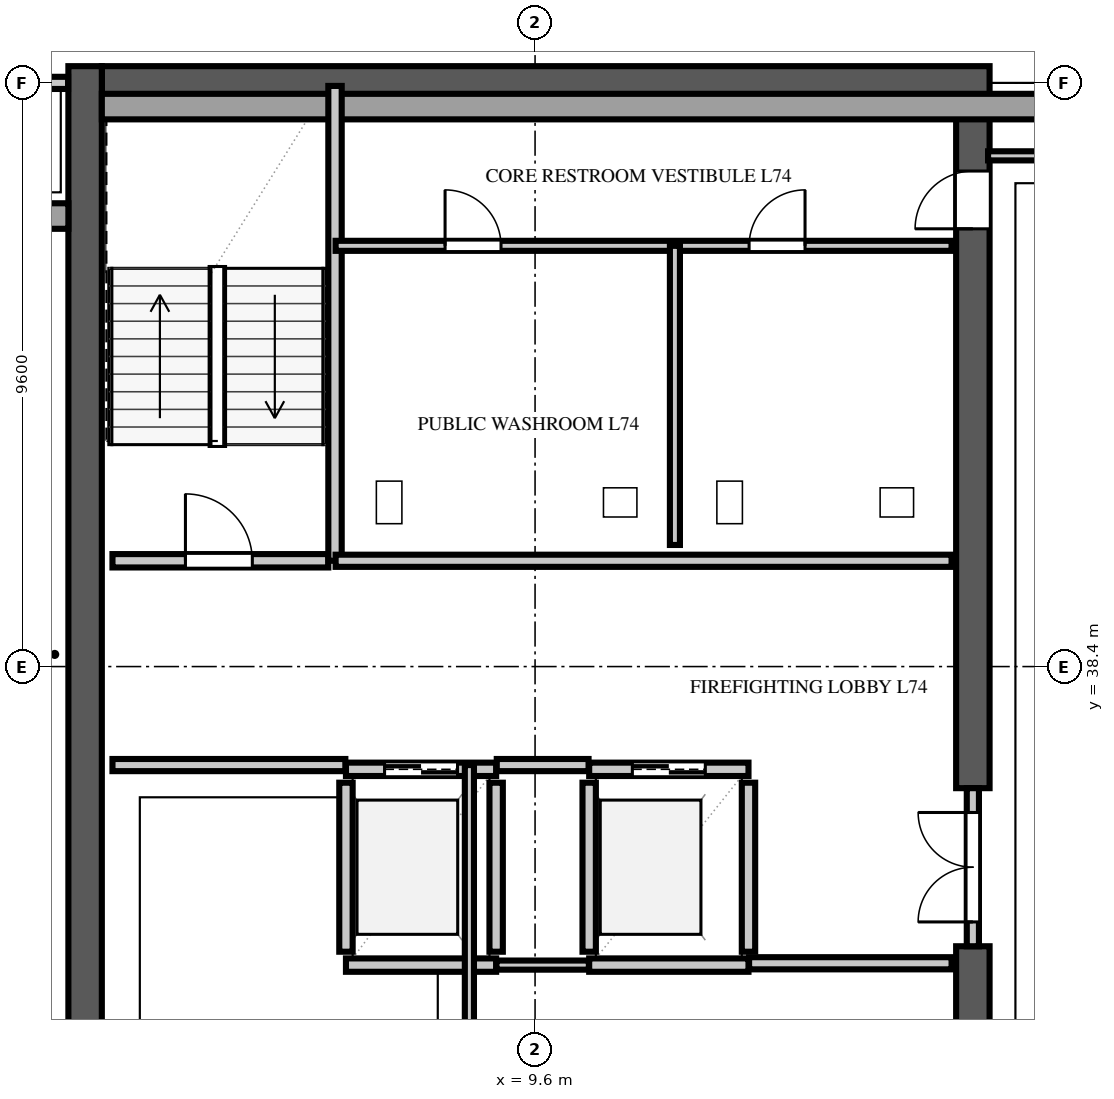
"""IFC4 building model, lengths in metres.
Left out: names, types, materials, properties, quantities, classifications, styles, units other than length and angle.
Written with IfcOpenShell. Run it as: python <this file> out.ifc"""

import sys

from ifc_helpers import new_model, si_unit, direction, frame, frame_2d, origin, place, context, subcontext, project, spatial, rectangle, extrude, element, fill, save


model = new_model("IFC4")
c1 = context("Model", 3, precision=1e-05, world=origin(), true_north=direction((0.0, 1.0)))
c2 = subcontext(c1, "Body", "Model", "MODEL_VIEW")
j1 = project(units=[si_unit("LENGTHUNIT", "METRE"), si_unit("PLANEANGLEUNIT", "RADIAN")], contexts=[c1])
p1 = place(None, origin())
s1 = spatial("IfcSite", under=j1, at=p1, CompositionType="ELEMENT")
p2 = place(p1, origin())
s2 = spatial("IfcBuilding", under=s1, at=p2, CompositionType="ELEMENT")
p3 = place(p2, frame((0.0, 0.0, 292.4)))
s3 = spatial("IfcBuildingStorey", under=s2, at=p3, CompositionType="ELEMENT", Elevation=292.4)
p4 = place(p3, frame((2.475, 48.0, 0.0), z_axis=(0.0, 0.0, 1.0), x_axis=(1.0, 0.0, 0.0)))
e1 = element("IfcWall", 1, at=p4, inside=s3, PredefinedType="SHEAR", context=c2, shape_type="SweptSolid", body=[
    extrude(rectangle(XDim=14.6, YDim=0.55, at=frame_2d((7.3, 0.0))), origin(), (0.0, 0.0, 1.0), 3.54),
])
p5 = place(p3, frame((2.2, 9.325, 0.0), z_axis=(0.0, 0.0, 1.0), x_axis=(0.0, 1.0, 0.0)))
e2 = element("IfcWall", 2, at=p5, inside=s3, PredefinedType="SHEAR", context=c2, shape_type="SweptSolid", body=[
    extrude(rectangle(XDim=38.95, YDim=0.55, at=frame_2d((19.475, 0.0))), origin(), (0.0, 0.0, 1.0), 3.54),
])
p6 = place(p3, frame((16.8, 26.0, 0.0), z_axis=(0.0, 0.0, 1.0), x_axis=(0.0, 1.0, 0.0)))
e3 = element("IfcWall", 3, at=p6, inside=s3, PredefinedType="SHEAR", context=c2, shape_type="SweptSolid", body=[
    extrude(rectangle(XDim=7.8, YDim=0.55, at=frame_2d((3.9, 0.0))), origin(), (0.0, 0.0, 1.0), 3.54),
])
p7 = place(p3, frame((16.8, 36.4, 0.0), z_axis=(0.0, 0.0, 1.0), x_axis=(0.0, 1.0, 0.0)))
e4 = element("IfcWall", 4, at=p7, inside=s3, PredefinedType="SHEAR", context=c2, shape_type="SweptSolid", body=[
    extrude(rectangle(XDim=11.325, YDim=0.55, at=frame_2d((5.663, 0.0))), origin(), (0.0, 0.0, 1.0), 3.54),
])
p8 = place(p7, frame((9.2, 0.0, 0.0)))
e5 = element("IfcOpeningElement", 5, at=p8, cuts=e4, PredefinedType="OPENING", context=c2, shape_type="SweptSolid", body=[
    extrude(rectangle(XDim=0.95, YDim=2.15, at=frame_2d((0.475, 1.075))), frame((0.0, 0.287, 0.0), z_axis=(0.0, -1.0, 0.0), x_axis=(1.0, 0.0, 0.0)), (0.0, 0.0, 1.0), 0.574),
])
p9 = place(p3, frame((36.56, 47.61, 0.0), z_axis=(0.0, 0.0, 1.0), x_axis=(-1.0, 0.0, 0.0)))
e6 = element("IfcWall", 6, at=p9, inside=s3, PredefinedType="SOLIDWALL", context=c2, shape_type="SweptSolid", body=[
    extrude(rectangle(XDim=34.085, YDim=0.42, at=frame_2d((17.042, 0.0))), origin(), (0.0, 0.0, 1.0), 3.54),
])
p10 = place(p9, frame((4.885, 0.0, 0.9)))
e7 = element("IfcOpeningElement", 7, at=p10, cuts=e6, PredefinedType="OPENING", context=c2, shape_type="SweptSolid", body=[
    extrude(rectangle(XDim=0.95, YDim=1.85, at=frame_2d((0.475, 0.925))), frame((0.0, 0.222, 0.0), z_axis=(0.0, -1.0, 0.0), x_axis=(1.0, 0.0, 0.0)), (0.0, 0.0, 1.0), 0.444),
])
p11 = place(p9, frame((9.41, 0.0, 0.9)))
e8 = element("IfcOpeningElement", 8, at=p11, cuts=e6, PredefinedType="OPENING", context=c2, shape_type="SweptSolid", body=[
    extrude(rectangle(XDim=1.5, YDim=1.85, at=frame_2d((0.75, 0.925))), frame((0.0, 0.222, 0.0), z_axis=(0.0, -1.0, 0.0), x_axis=(1.0, 0.0, 0.0)), (0.0, 0.0, 1.0), 0.444),
])
p12 = place(p9, frame((14.485, 0.0, 0.9)))
e9 = element("IfcOpeningElement", 9, at=p12, cuts=e6, PredefinedType="OPENING", context=c2, shape_type="SweptSolid", body=[
    extrude(rectangle(XDim=0.95, YDim=1.85, at=frame_2d((0.475, 0.925))), frame((0.0, 0.222, 0.0), z_axis=(0.0, -1.0, 0.0), x_axis=(1.0, 0.0, 0.0)), (0.0, 0.0, 1.0), 0.444),
])
p13 = place(p3, frame((1.925, 45.81, 0.0), z_axis=(0.0, 0.0, 1.0), x_axis=(-1.0, 0.0, 0.0)))
e10 = element("IfcWall", 10, at=p13, inside=s3, PredefinedType="SOLIDWALL", context=c2, shape_type="SweptSolid", body=[
    extrude(rectangle(XDim=1.885, YDim=0.42, at=frame_2d((0.942, 0.0))), origin(), (0.0, 0.0, 1.0), 3.54),
])
p14 = place(p3, frame((2.65, 40.14, 0.0), z_axis=(0.0, 0.0, 1.0), x_axis=(1.0, 0.0, 0.0)))
e11 = element("IfcWall", 11, at=p14, inside=s3, PredefinedType="SOLIDWALL", context=c2, shape_type="SweptSolid", body=[
    extrude(rectangle(XDim=3.55, YDim=0.22, at=frame_2d((1.775, 0.0))), origin(), (0.0, 0.0, 1.0), 3.54),
])
p15 = place(p14, frame((1.2, 0.0, 0.0)))
e12 = element("IfcOpeningElement", 12, at=p15, cuts=e11, PredefinedType="OPENING", context=c2, shape_type="SweptSolid", body=[
    extrude(rectangle(XDim=1.1, YDim=2.2, at=frame_2d((0.55, 1.1))), frame((0.0, 0.122, 0.0), z_axis=(0.0, -1.0, 0.0), x_axis=(1.0, 0.0, 0.0)), (0.0, 0.0, 1.0), 0.244),
])
p16 = place(p3, frame((6.31, 40.14, 0.0), z_axis=(0.0, 0.0, 1.0), x_axis=(0.0, 1.0, 0.0)))
e13 = element("IfcWall", 13, at=p16, inside=s3, PredefinedType="SOLIDWALL", context=c2, shape_type="SweptSolid", body=[
    extrude(rectangle(XDim=7.81, YDim=0.22, at=frame_2d((3.905, 0.0))), origin(), (0.0, 0.0, 1.0), 3.54),
])
for number, where, z_axis, x_axis in (
    (14, (6.49, 33.71, 0.0), (0.0, 0.0, 1.0), (0.0, 1.0, 0.0)),
    (15, (8.96, 33.71, 0.0), (0.0, 0.0, 1.0), (0.0, 1.0, 0.0)),
):
    element("IfcWall", number, at=place(p3, frame(where, z_axis=z_axis, x_axis=x_axis)), inside=s3, PredefinedType="SOLIDWALL", context=c2, shape_type="SweptSolid", body=[
        extrude(rectangle(XDim=2.78, YDim=0.22, at=frame_2d((1.39, 0.0))), origin(), (0.0, 0.0, 1.0), 3.54),
    ])
p17 = place(p3, frame((6.49, 33.49, 0.0), z_axis=(0.0, 0.0, 1.0), x_axis=(1.0, 0.0, 0.0)))
e16 = element("IfcWall", 16, at=p17, inside=s3, PredefinedType="SOLIDWALL", context=c2, shape_type="SweptSolid", body=[
    extrude(rectangle(XDim=2.47, YDim=0.22, at=frame_2d((1.235, 0.0))), origin(), (0.0, 0.0, 1.0), 3.54),
])
p18 = place(p3, frame((6.49, 36.71, 0.0), z_axis=(0.0, 0.0, 1.0), x_axis=(1.0, 0.0, 0.0)))
e17 = element("IfcWall", 17, at=p18, inside=s3, PredefinedType="SOLIDWALL", context=c2, shape_type="SweptSolid", body=[
    extrude(rectangle(XDim=2.47, YDim=0.22, at=frame_2d((1.235, 0.0))), origin(), (0.0, 0.0, 1.0), 3.54),
])
p19 = place(p18, frame((0.635, 0.0, 0.0)))
e18 = element("IfcOpeningElement", 18, at=p19, cuts=e17, PredefinedType="OPENING", context=c2, shape_type="SweptSolid", body=[
    extrude(rectangle(XDim=1.2, YDim=2.2, at=frame_2d((0.6, 1.1))), frame((0.0, 0.122, 0.0), z_axis=(0.0, -1.0, 0.0), x_axis=(1.0, 0.0, 0.0)), (0.0, 0.0, 1.0), 0.244),
])
for number, where, z_axis, x_axis in (
    (19, (10.49, 33.71, 0.0), (0.0, 0.0, 1.0), (0.0, 1.0, 0.0)),
    (20, (13.11, 33.71, 0.0), (0.0, 0.0, 1.0), (0.0, 1.0, 0.0)),
):
    element("IfcWall", number, at=place(p3, frame(where, z_axis=z_axis, x_axis=x_axis)), inside=s3, PredefinedType="SOLIDWALL", context=c2, shape_type="SweptSolid", body=[
        extrude(rectangle(XDim=2.78, YDim=0.22, at=frame_2d((1.39, 0.0))), origin(), (0.0, 0.0, 1.0), 3.54),
    ])
p20 = place(p3, frame((10.49, 33.49, 0.0), z_axis=(0.0, 0.0, 1.0), x_axis=(1.0, 0.0, 0.0)))
e21 = element("IfcWall", 21, at=p20, inside=s3, PredefinedType="SOLIDWALL", context=c2, shape_type="SweptSolid", body=[
    extrude(rectangle(XDim=2.62, YDim=0.22, at=frame_2d((1.31, 0.0))), origin(), (0.0, 0.0, 1.0), 3.54),
])
p21 = place(p3, frame((10.49, 36.71, 0.0), z_axis=(0.0, 0.0, 1.0), x_axis=(1.0, 0.0, 0.0)))
e22 = element("IfcWall", 22, at=p21, inside=s3, PredefinedType="SOLIDWALL", context=c2, shape_type="SweptSolid", body=[
    extrude(rectangle(XDim=2.62, YDim=0.22, at=frame_2d((1.31, 0.0))), origin(), (0.0, 0.0, 1.0), 3.54),
])
p22 = place(p21, frame((0.71, 0.0, 0.0)))
e23 = element("IfcOpeningElement", 23, at=p22, cuts=e22, PredefinedType="OPENING", context=c2, shape_type="SweptSolid", body=[
    extrude(rectangle(XDim=1.2, YDim=2.2, at=frame_2d((0.6, 1.1))), frame((0.0, 0.122, 0.0), z_axis=(0.0, -1.0, 0.0), x_axis=(1.0, 0.0, 0.0)), (0.0, 0.0, 1.0), 0.244),
])
p23 = place(p3, frame((2.65, 36.78, 0.0), z_axis=(0.0, 0.0, 1.0), x_axis=(1.0, 0.0, 0.0)))
e24 = element("IfcWall", 24, at=p23, inside=s3, PredefinedType="SOLIDWALL", context=c2, shape_type="SweptSolid", body=[
    extrude(rectangle(XDim=3.83, YDim=0.2, at=frame_2d((1.915, 0.0))), origin(), (0.0, 0.0, 1.0), 3.54),
])
p24 = place(p3, frame((8.97, 36.78, 0.0), z_axis=(0.0, 0.0, 1.0), x_axis=(1.0, 0.0, 0.0)))
e25 = element("IfcWall", 25, at=p24, inside=s3, PredefinedType="SOLIDWALL", context=c2, shape_type="SweptSolid", body=[
    extrude(rectangle(XDim=1.51, YDim=0.2, at=frame_2d((0.755, 0.0))), origin(), (0.0, 0.0, 1.0), 3.54),
])
p25 = place(p3, frame((13.12, 33.52, 0.0), z_axis=(0.0, 0.0, 1.0), x_axis=(1.0, 0.0, 0.0)))
e26 = element("IfcWall", 26, at=p25, inside=s3, PredefinedType="SOLIDWALL", context=c2, shape_type="SweptSolid", body=[
    extrude(rectangle(XDim=3.33, YDim=0.2, at=frame_2d((1.665, 0.0))), origin(), (0.0, 0.0, 1.0), 3.54),
])
p26 = place(p3, frame((6.32, 40.14, 0.0), z_axis=(0.0, 0.0, 1.0), x_axis=(1.0, 0.0, 0.0)))
e27 = element("IfcWall", 27, at=p26, inside=s3, PredefinedType="SOLIDWALL", context=c2, shape_type="SweptSolid", body=[
    extrude(rectangle(XDim=10.13, YDim=0.2, at=frame_2d((5.065, 0.0))), origin(), (0.0, 0.0, 1.0), 3.54),
])
p27 = place(p3, frame((16.8, 33.8, 0.0), z_axis=(0.0, 0.0, 1.0), x_axis=(0.0, 1.0, 0.0)))
e28 = element("IfcWall", 28, at=p27, inside=s3, PredefinedType="SOLIDWALL", context=c2, shape_type="SweptSolid", body=[
    extrude(rectangle(XDim=2.6, YDim=0.2, at=frame_2d((1.3, 0.0))), origin(), (0.0, 0.0, 1.0), 3.54),
])
p28 = place(p27, frame((0.4, 0.0, 0.0)))
e29 = element("IfcOpeningElement", 29, at=p28, cuts=e28, PredefinedType="OPENING", context=c2, shape_type="SweptSolid", body=[
    extrude(rectangle(XDim=1.8, YDim=2.2, at=frame_2d((0.9, 1.1))), frame((0.0, 0.112, 0.0), z_axis=(0.0, -1.0, 0.0), x_axis=(1.0, 0.0, 0.0)), (0.0, 0.0, 1.0), 0.224),
])
p29 = place(p3, frame((8.965, 33.49, 0.0), z_axis=(0.0, 0.0, 1.0), x_axis=(1.0, 0.0, 0.0)))
e30 = element("IfcWall", 30, at=p29, inside=s3, PredefinedType="PARTITIONING", context=c2, shape_type="SweptSolid", body=[
    extrude(rectangle(XDim=1.52, YDim=0.15, at=frame_2d((0.76, 0.0))), origin(), (0.0, 0.0, 1.0), 3.54),
])
p30 = place(p3, frame((8.52, 12.02, 0.0), z_axis=(0.0, 0.0, 1.0), x_axis=(0.0, 1.0, 0.0)))
e31 = element("IfcWall", 31, at=p30, inside=s3, PredefinedType="PARTITIONING", context=c2, shape_type="SweptSolid", body=[
    extrude(rectangle(XDim=24.76, YDim=0.15, at=frame_2d((12.38, 0.0))), origin(), (0.0, 0.0, 1.0), 3.54),
])
p31 = place(p30, frame((2.0, 0.0, 0.0)))
e32 = element("IfcOpeningElement", 32, at=p31, cuts=e31, PredefinedType="OPENING", context=c2, shape_type="SweptSolid", body=[
    extrude(rectangle(XDim=0.85, YDim=2.1, at=frame_2d((0.425, 1.05))), frame((0.0, 0.087, 0.0), z_axis=(0.0, -1.0, 0.0), x_axis=(1.0, 0.0, 0.0)), (0.0, 0.0, 1.0), 0.174),
])
p32 = place(p30, frame((12.0, 0.0, 0.0)))
e33 = element("IfcOpeningElement", 33, at=p32, cuts=e31, PredefinedType="OPENING", context=c2, shape_type="SweptSolid", body=[
    extrude(rectangle(XDim=1.0, YDim=2.2, at=frame_2d((0.5, 1.1))), frame((0.0, 0.087, 0.0), z_axis=(0.0, -1.0, 0.0), x_axis=(1.0, 0.0, 0.0)), (0.0, 0.0, 1.0), 0.174),
])
p33 = place(p3, frame((6.32, 45.32, 0.0), z_axis=(0.0, 0.0, 1.0), x_axis=(1.0, 0.0, 0.0)))
e34 = element("IfcWall", 34, at=p33, inside=s3, PredefinedType="PLUMBINGWALL", context=c2, shape_type="SweptSolid", body=[
    extrude(rectangle(XDim=10.13, YDim=0.165, at=frame_2d((5.065, 0.0))), origin(), (0.0, 0.0, 1.0), 3.54),
])
p34 = place(p33, frame((1.8, 0.0, 0.0)))
e35 = element("IfcOpeningElement", 35, at=p34, cuts=e34, PredefinedType="OPENING", context=c2, shape_type="SweptSolid", body=[
    extrude(rectangle(XDim=0.92, YDim=2.15, at=frame_2d((0.46, 1.075))), frame((0.0, 0.094, 0.0), z_axis=(0.0, -1.0, 0.0), x_axis=(1.0, 0.0, 0.0)), (0.0, 0.0, 1.0), 0.189),
])
p35 = place(p33, frame((6.8, 0.0, 0.0)))
e36 = element("IfcOpeningElement", 36, at=p35, cuts=e34, PredefinedType="OPENING", context=c2, shape_type="SweptSolid", body=[
    extrude(rectangle(XDim=0.92, YDim=2.15, at=frame_2d((0.46, 1.075))), frame((0.0, 0.094, 0.0), z_axis=(0.0, -1.0, 0.0), x_axis=(1.0, 0.0, 0.0)), (0.0, 0.0, 1.0), 0.189),
])
p36 = place(p3, frame((11.9, 40.4, 0.0), z_axis=(0.0, 0.0, 1.0), x_axis=(0.0, 1.0, 0.0)))
e37 = element("IfcWall", 37, at=p36, inside=s3, PredefinedType="PLUMBINGWALL", context=c2, shape_type="SweptSolid", body=[
    extrude(rectangle(XDim=4.92, YDim=0.165, at=frame_2d((2.46, 0.0))), origin(), (0.0, 0.0, 1.0), 3.54),
])
p37 = place(p3, frame((0.85, 48.0, 0.0), z_axis=(0.0, 0.0, 1.0), x_axis=(1.0, 0.0, 0.0)))
e38 = element("IfcWall", 38, at=p37, inside=s3, PredefinedType="SOLIDWALL", context=c2, shape_type="SweptSolid", body=[
    extrude(rectangle(XDim=1.07, YDim=0.2, at=frame_2d((0.535, 0.0))), origin(), (0.0, 0.0, 1.0), 3.54),
])
p38 = place(p3, frame((17.05, 46.8, 0.0), z_axis=(0.0, 0.0, 1.0), x_axis=(1.0, 0.0, 0.0)))
e39 = element("IfcWall", 39, at=p38, inside=s3, PredefinedType="PARTITIONING", context=c2, shape_type="SweptSolid", body=[
    extrude(rectangle(XDim=2.15, YDim=0.15, at=frame_2d((1.075, 0.0))), origin(), (0.0, 0.0, 1.0), 3.54),
])
p39 = place(p15, origin())
e40 = element("IfcDoor", 40, at=p39, inside=s3, OperationType="SINGLE_SWING_LEFT", PredefinedType="DOOR", context=c2, shape_type="SweptSolid", body=[
    extrude(rectangle(XDim=1.1, YDim=2.2, at=frame_2d((0.55, 1.1))), frame((0.0, 0.025, 0.0), z_axis=(0.0, -1.0, 0.0), x_axis=(1.0, 0.0, 0.0)), (0.0, 0.0, 1.0), 0.05),
])
fill(e12, e40)
p40 = place(p19, origin())
e41 = element("IfcDoor", 41, at=p40, inside=s3, OperationType="DOUBLE_DOOR_SLIDING", PredefinedType="DOOR", context=c2, shape_type="SweptSolid", body=[
    extrude(rectangle(XDim=1.2, YDim=2.2, at=frame_2d((0.6, 1.1))), frame((0.0, 0.025, 0.0), z_axis=(0.0, -1.0, 0.0), x_axis=(1.0, 0.0, 0.0)), (0.0, 0.0, 1.0), 0.05),
])
fill(e18, e41)
p41 = place(p22, origin())
e42 = element("IfcDoor", 42, at=p41, inside=s3, OperationType="DOUBLE_DOOR_SLIDING", PredefinedType="DOOR", context=c2, shape_type="SweptSolid", body=[
    extrude(rectangle(XDim=1.2, YDim=2.2, at=frame_2d((0.6, 1.1))), frame((0.0, 0.025, 0.0), z_axis=(0.0, -1.0, 0.0), x_axis=(1.0, 0.0, 0.0)), (0.0, 0.0, 1.0), 0.05),
])
fill(e23, e42)
p42 = place(p8, origin())
e43 = element("IfcDoor", 43, at=p42, inside=s3, OperationType="SINGLE_SWING_LEFT", PredefinedType="DOOR", context=c2, shape_type="SweptSolid", body=[
    extrude(rectangle(XDim=0.95, YDim=2.15, at=frame_2d((0.475, 1.075))), frame((0.0, 0.025, 0.0), z_axis=(0.0, -1.0, 0.0), x_axis=(1.0, 0.0, 0.0)), (0.0, 0.0, 1.0), 0.05),
])
fill(e5, e43)
p43 = place(p28, origin())
e44 = element("IfcDoor", 44, at=p43, inside=s3, OperationType="DOUBLE_DOOR_SINGLE_SWING", PredefinedType="DOOR", context=c2, shape_type="SweptSolid", body=[
    extrude(rectangle(XDim=1.8, YDim=2.2, at=frame_2d((0.9, 1.1))), frame((0.0, 0.025, 0.0), z_axis=(0.0, -1.0, 0.0), x_axis=(1.0, 0.0, 0.0)), (0.0, 0.0, 1.0), 0.05),
])
fill(e29, e44)
p44 = place(p34, origin())
e45 = element("IfcDoor", 45, at=p44, inside=s3, OperationType="SINGLE_SWING_LEFT", PredefinedType="DOOR", context=c2, shape_type="SweptSolid", body=[
    extrude(rectangle(XDim=0.92, YDim=2.15, at=frame_2d((0.46, 1.075))), frame((0.0, 0.025, 0.0), z_axis=(0.0, -1.0, 0.0), x_axis=(1.0, 0.0, 0.0)), (0.0, 0.0, 1.0), 0.05),
])
fill(e35, e45)
p45 = place(p35, origin())
e46 = element("IfcDoor", 46, at=p45, inside=s3, OperationType="SINGLE_SWING_RIGHT", PredefinedType="DOOR", context=c2, shape_type="SweptSolid", body=[
    extrude(rectangle(XDim=0.92, YDim=2.15, at=frame_2d((0.46, 1.075))), frame((0.0, 0.025, 0.0), z_axis=(0.0, -1.0, 0.0), x_axis=(1.0, 0.0, 0.0)), (0.0, 0.0, 1.0), 0.05),
])
fill(e36, e46)
save(model, sys.argv[1])
